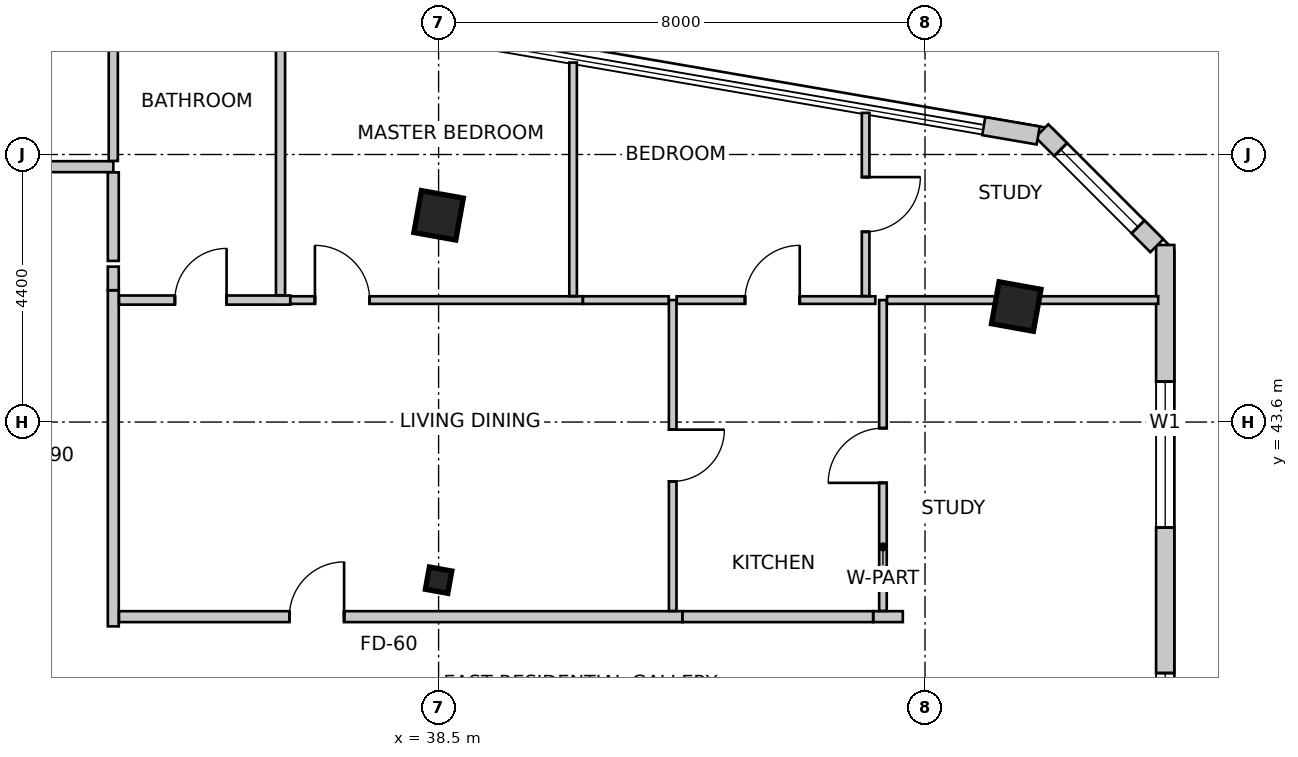
"""IFC4 building model, lengths in metres.
Left out: names, types, materials, properties, quantities, classifications, styles, units other than length and angle.
Written with IfcOpenShell. Run it as: python <this file> out.ifc"""

import sys

from ifc_helpers import new_model, si_unit, direction, frame, frame_2d, origin, origin_2d, place, context, subcontext, project, spatial, rectangle, i_section, extrude, source, transform, mapped, element, fill, save


model = new_model("IFC4")
c1 = context("Model", 3, precision=1e-05, world=origin(), true_north=direction((0.0, 1.0)))
c2 = subcontext(c1, "Body", "Model", "MODEL_VIEW")
j1 = project(units=[si_unit("LENGTHUNIT", "METRE"), si_unit("PLANEANGLEUNIT", "RADIAN")], contexts=[c1])
p1 = place(None, origin())
s1 = spatial("IfcSite", under=j1, at=p1, CompositionType="ELEMENT")
p2 = place(p1, origin())
s2 = spatial("IfcBuilding", under=s1, at=p2, CompositionType="ELEMENT")
p3 = place(p2, frame((0.0, 0.0, 183.4)))
s3 = spatial("IfcBuildingStorey", under=s2, at=p3, CompositionType="ELEMENT", Elevation=183.4)
m1 = source(origin(), c2, "Body", "SweptSolid", [
    extrude(rectangle(XDim=0.7, YDim=0.7, at=origin_2d()), origin(), (0.0, 0.0, 1.0), 3.5),
])
for number, where, z_axis, x_axis in (
    (1, (38.5, 47.0, 0.0), (0.0, 0.0, 1.0), (0.984, -0.177, 0.0)),
    (2, (48.0, 45.5, 0.0), (0.0, 0.0, 1.0), (0.984, -0.177, 0.0)),
):
    element("IfcColumn", number, at=place(p3, frame(where, z_axis=z_axis, x_axis=x_axis)), inside=s3, PredefinedType="COLUMN", context=c2, shape_type="MappedRepresentation", body=[
        mapped(m1, transform((0.0, 0.0, 0.0), scale=1.0)),
    ])
m2 = source(origin(), c2, "Body", "SweptSolid", [
    extrude(i_section(OverallWidth=0.374, OverallDepth=0.372, WebThickness=0.016, FlangeThickness=0.026, FilletRadius=0.015, at=origin_2d()), origin(), (0.0, 0.0, 1.0), 3.5),
])
p4 = place(p3, frame((38.5, 41.0, 0.0), z_axis=(0.0, 0.0, 1.0), x_axis=(0.984195607969, -0.17708474032, 0.0)))
e3 = element("IfcColumn", 3, at=p4, inside=s3, PredefinedType="COLUMN", context=c2, shape_type="MappedRepresentation", body=[
    mapped(m2, transform((0.0, 0.0, 0.0), scale=1.0)),
])
p5 = place(p3, frame((50.45, 35.781, 0.0), z_axis=(0.0, 0.0, 1.0), x_axis=(0.0, 1.0, 0.0)))
e4 = element("IfcWall", 4, at=p5, inside=s3, PredefinedType="SOLIDWALL", context=c2, shape_type="SweptSolid", body=[
    extrude(rectangle(XDim=10.731, YDim=0.3, at=frame_2d((5.365, 0.0))), origin(), (0.0, 0.0, 1.0), 3.25),
])
m3 = source(origin(), c2, "Body", "SweptSolid", [
    extrude(rectangle(XDim=2.1, YDim=2.0, at=frame_2d((1.05, 1.0))), frame((0.0, 0.16, 0.0), z_axis=(0.0, -1.0, 0.0), x_axis=(1.0, 0.0, 0.0)), (0.0, 0.0, 1.0), 0.32),
])
p6 = place(p5, frame((1.591, 0.0, 0.85)))
e5 = element("IfcOpeningElement", 5, at=p6, cuts=e4, PredefinedType="OPENING", context=c2, shape_type="MappedRepresentation", body=[
    mapped(m3, transform((0.0, 0.0, 0.0), scale=1.0)),
])
m4 = source(origin(), c2, "Body", "SweptSolid", [
    extrude(rectangle(XDim=2.4, YDim=2.2, at=frame_2d((1.2, 1.1))), frame((0.0, 0.16, 0.0), z_axis=(0.0, -1.0, 0.0), x_axis=(1.0, 0.0, 0.0)), (0.0, 0.0, 1.0), 0.32),
])
p7 = place(p5, frame((6.084, 0.0, 0.85)))
e6 = element("IfcOpeningElement", 6, at=p7, cuts=e4, PredefinedType="OPENING", context=c2, shape_type="MappedRepresentation", body=[
    mapped(m4, transform((0.0, 0.0, 0.0), scale=1.0)),
])
p8 = place(p3, frame((50.312, 46.5, 0.0), z_axis=(0.0, 0.0, 1.0), x_axis=(-0.707106781187, 0.707106781187, 0.0)))
e7 = element("IfcWall", 7, at=p8, inside=s3, PredefinedType="SOLIDWALL", context=c2, shape_type="SweptSolid", body=[
    extrude(rectangle(XDim=2.673, YDim=0.3, at=frame_2d((1.337, 0.0))), origin(), (0.0, 0.0, 1.0), 3.25),
])
m5 = source(origin(), c2, "Body", "SweptSolid", [
    extrude(rectangle(XDim=1.8, YDim=2.1, at=frame_2d((0.9, 1.05))), frame((0.0, 0.16, 0.0), z_axis=(0.0, -1.0, 0.0), x_axis=(1.0, 0.0, 0.0)), (0.0, 0.0, 1.0), 0.32),
])
p9 = place(p8, frame((0.437, 0.0, 0.85)))
e8 = element("IfcOpeningElement", 8, at=p9, cuts=e7, PredefinedType="OPENING", context=c2, shape_type="MappedRepresentation", body=[
    mapped(m5, transform((0.0, 0.0, 0.0), scale=1.0)),
])
p10 = place(p3, frame((48.361, 48.313, 0.0), z_axis=(0.0, 0.0, 1.0), x_axis=(-0.985560806516, 0.169321872949, 0.0)))
e9 = element("IfcWall", 9, at=p10, inside=s3, PredefinedType="SOLIDWALL", context=c2, shape_type="SweptSolid", body=[
    extrude(rectangle(XDim=0.908, YDim=0.3, at=frame_2d((0.454, 0.0))), origin(), (0.0, 0.0, 1.0), 3.25),
])
p11 = place(p3, frame((28.362, 47.8, 0.0), z_axis=(0.0, 0.0, 1.0), x_axis=(1.0, 0.0, 0.0)))
e10 = element("IfcWall", 10, at=p11, inside=s3, PredefinedType="PARTITIONING", context=c2, shape_type="SweptSolid", body=[
    extrude(rectangle(XDim=4.788, YDim=0.18, at=frame_2d((2.394, 0.0))), origin(), (0.0, 0.0, 1.0), 2.688),
])
m6 = source(origin(), c2, "Body", "SweptSolid", [
    extrude(rectangle(XDim=0.85, YDim=2.15, at=frame_2d((0.425, 1.075))), frame((0.0, 0.1, 0.0), z_axis=(0.0, -1.0, 0.0), x_axis=(1.0, 0.0, 0.0)), (0.0, 0.0, 1.0), 0.2),
])
p12 = place(p11, frame((0.401, 0.0, 0.0)))
e11 = element("IfcOpeningElement", 11, at=p12, cuts=e10, PredefinedType="OPENING", context=c2, shape_type="MappedRepresentation", body=[
    mapped(m6, transform((0.0, 0.0, 0.0), scale=1.0)),
])
p13 = place(p3, frame((33.15, 47.706, 0.0), z_axis=(0.0, 0.0, 1.0), x_axis=(0.0, -1.0, 0.0)))
e12 = element("IfcWall", 12, at=p13, inside=s3, PredefinedType="PARTITIONING", context=c2, shape_type="SweptSolid", body=[
    extrude(rectangle(XDim=1.456, YDim=0.18, at=frame_2d((0.728, 0.0))), origin(), (0.0, 0.0, 1.0), 2.688),
])
p14 = place(p3, frame((33.15, 45.766, 0.0), z_axis=(0.0, 0.0, 1.0), x_axis=(0.0, -1.0, 0.0)))
e13 = element("IfcWall", 13, at=p14, inside=s3, PredefinedType="PARTITIONING", context=c2, shape_type="SweptSolid", body=[
    extrude(rectangle(XDim=5.526, YDim=0.18, at=frame_2d((2.763, 0.0))), origin(), (0.0, 0.0, 1.0), 2.688),
])
p15 = place(p3, frame((33.15, 46.156, 0.0), z_axis=(0.0, 0.0, 1.0), x_axis=(0.0, -1.0, 0.0)))
e14 = element("IfcWall", 14, at=p15, inside=s3, PredefinedType="PARTITIONING", context=c2, shape_type="SweptSolid", body=[
    extrude(rectangle(XDim=0.388, YDim=0.18, at=frame_2d((0.194, 0.0))), origin(), (0.0, 0.0, 1.0), 3.25),
])
p16 = place(p3, frame((33.15, 50.813, 0.0), z_axis=(0.0, 0.0, 1.0), x_axis=(0.0, -1.0, 0.0)))
e15 = element("IfcWall", 15, at=p16, inside=s3, PredefinedType="PARTITIONING", context=c2, shape_type="SweptSolid", body=[
    extrude(rectangle(XDim=2.919, YDim=0.15, at=frame_2d((1.459, 0.0))), origin(), (0.0, 0.0, 1.0), 2.542),
])
p17 = place(p3, frame((45.648, 40.4, 0.0), z_axis=(0.0, 0.0, 1.0), x_axis=(1.0, 0.0, 0.0)))
e16 = element("IfcWall", 16, at=p17, inside=s3, PredefinedType="PARTITIONING", context=c2, shape_type="SweptSolid", body=[
    extrude(rectangle(XDim=0.487, YDim=0.18, at=frame_2d((0.244, 0.0))), origin(), (0.0, 0.0, 1.0), 3.25),
])
p18 = place(p3, frame((33.244, 40.4, 0.0), z_axis=(0.0, 0.0, 1.0), x_axis=(1.0, 0.0, 0.0)))
e17 = element("IfcWall", 17, at=p18, inside=s3, PredefinedType="PARTITIONING", context=c2, shape_type="SweptSolid", body=[
    extrude(rectangle(XDim=9.266, YDim=0.18, at=frame_2d((4.633, 0.0))), origin(), (0.0, 0.0, 1.0), 2.688),
])
m7 = source(origin(), c2, "Body", "SweptSolid", [
    extrude(rectangle(XDim=0.9, YDim=2.15, at=frame_2d((0.45, 1.075))), frame((0.0, 0.1, 0.0), z_axis=(0.0, -1.0, 0.0), x_axis=(1.0, 0.0, 0.0)), (0.0, 0.0, 1.0), 0.2),
])
p19 = place(p18, frame((2.802, 0.0, 0.0)))
e18 = element("IfcOpeningElement", 18, at=p19, cuts=e17, PredefinedType="OPENING", context=c2, shape_type="MappedRepresentation", body=[
    mapped(m7, transform((0.0, 0.0, 0.0), scale=1.0)),
])
p20 = place(p3, frame((42.512, 40.4, 0.0), z_axis=(0.0, 0.0, 1.0), x_axis=(1.0, 0.0, 0.0)))
e19 = element("IfcWall", 19, at=p20, inside=s3, PredefinedType="PARTITIONING", context=c2, shape_type="SweptSolid", body=[
    extrude(rectangle(XDim=3.134, YDim=0.18, at=frame_2d((1.567, 0.0))), origin(), (0.0, 0.0, 1.0), 2.688),
])
p21 = place(p3, frame((45.808, 40.494, 0.0), z_axis=(0.0, 0.0, 1.0), x_axis=(0.0, 1.0, 0.0)))
e20 = element("IfcWall", 20, at=p21, inside=s3, PredefinedType="PARTITIONING", context=c2, shape_type="SweptSolid", body=[
    extrude(rectangle(XDim=5.112, YDim=0.125, at=frame_2d((2.556, 0.0))), origin(), (0.0, 0.0, 1.0), 2.688),
])
m8 = source(origin(), c2, "Body", "SweptSolid", [
    extrude(rectangle(XDim=0.9, YDim=2.15, at=frame_2d((0.45, 1.075))), frame((0.0, 0.073, 0.0), z_axis=(0.0, -1.0, 0.0), x_axis=(1.0, 0.0, 0.0)), (0.0, 0.0, 1.0), 0.145),
])
p22 = place(p21, frame((2.106, 0.0, 0.0)))
e21 = element("IfcOpeningElement", 21, at=p22, cuts=e20, PredefinedType="OPENING", context=c2, shape_type="MappedRepresentation", body=[
    mapped(m8, transform((0.0, 0.0, 0.0), scale=1.0)),
])
p23 = place(p3, frame((45.875, 45.606, 0.0), z_axis=(0.0, 0.0, 1.0), x_axis=(1.0, 0.0, 0.0)))
e22 = element("IfcWall", 22, at=p23, inside=s3, PredefinedType="PARTITIONING", context=c2, shape_type="SweptSolid", body=[
    extrude(rectangle(XDim=4.46, YDim=0.125, at=frame_2d((2.23, 0.0))), origin(), (0.0, 0.0, 1.0), 2.542),
])
p24 = place(p3, frame((42.35, 45.606, 0.0), z_axis=(0.0, 0.0, 1.0), x_axis=(0.0, -1.0, 0.0)))
e23 = element("IfcWall", 23, at=p24, inside=s3, PredefinedType="PARTITIONING", context=c2, shape_type="SweptSolid", body=[
    extrude(rectangle(XDim=5.112, YDim=0.125, at=frame_2d((2.556, 0.0))), origin(), (0.0, 0.0, 1.0), 2.835),
])
m9 = source(origin(), c2, "Body", "SweptSolid", [
    extrude(rectangle(XDim=0.85, YDim=2.15, at=frame_2d((0.425, 1.075))), frame((0.0, 0.073, 0.0), z_axis=(0.0, -1.0, 0.0), x_axis=(1.0, 0.0, 0.0)), (0.0, 0.0, 1.0), 0.145),
])
p25 = place(p24, frame((2.131, 0.0, 0.0)))
e24 = element("IfcOpeningElement", 24, at=p25, cuts=e23, PredefinedType="OPENING", context=c2, shape_type="MappedRepresentation", body=[
    mapped(m9, transform((0.0, 0.0, 0.0), scale=1.0)),
])
p26 = place(p3, frame((33.244, 45.606, 0.0), z_axis=(0.0, 0.0, 1.0), x_axis=(1.0, 0.0, 0.0)))
e25 = element("IfcWall", 25, at=p26, inside=s3, PredefinedType="PARTITIONING", context=c2, shape_type="SweptSolid", body=[
    extrude(rectangle(XDim=2.816, YDim=0.15, at=frame_2d((1.408, 0.0))), origin(), (0.0, 0.0, 1.0), 2.688),
])
m10 = source(origin(), c2, "Body", "SweptSolid", [
    extrude(rectangle(XDim=0.85, YDim=2.15, at=frame_2d((0.425, 1.075))), frame((0.0, 0.085, 0.0), z_axis=(0.0, -1.0, 0.0), x_axis=(1.0, 0.0, 0.0)), (0.0, 0.0, 1.0), 0.17),
])
p27 = place(p26, frame((0.919, 0.0, 0.0)))
e26 = element("IfcOpeningElement", 26, at=p27, cuts=e25, PredefinedType="OPENING", context=c2, shape_type="MappedRepresentation", body=[
    mapped(m10, transform((0.0, 0.0, 0.0), scale=1.0)),
])
p28 = place(p3, frame((36.062, 45.606, 0.0), z_axis=(0.0, 0.0, 1.0), x_axis=(1.0, 0.0, 0.0)))
e27 = element("IfcWall", 27, at=p28, inside=s3, PredefinedType="PARTITIONING", context=c2, shape_type="SweptSolid", body=[
    extrude(rectangle(XDim=4.81, YDim=0.125, at=frame_2d((2.405, 0.0))), origin(), (0.0, 0.0, 1.0), 2.766),
])
p29 = place(p28, frame((0.404, 0.0, 0.0)))
e28 = element("IfcOpeningElement", 28, at=p29, cuts=e27, PredefinedType="OPENING", context=c2, shape_type="MappedRepresentation", body=[
    mapped(m8, transform((0.0, 0.0, 0.0), scale=1.0)),
])
p30 = place(p3, frame((40.874, 45.606, 0.0), z_axis=(0.0, 0.0, 1.0), x_axis=(1.0, 0.0, 0.0)))
e29 = element("IfcWall", 29, at=p30, inside=s3, PredefinedType="PARTITIONING", context=c2, shape_type="SweptSolid", body=[
    extrude(rectangle(XDim=1.409, YDim=0.125, at=frame_2d((0.705, 0.0))), origin(), (0.0, 0.0, 1.0), 3.25),
])
p31 = place(p3, frame((42.417, 45.606, 0.0), z_axis=(0.0, 0.0, 1.0), x_axis=(1.0, 0.0, 0.0)))
e30 = element("IfcWall", 30, at=p31, inside=s3, PredefinedType="PARTITIONING", context=c2, shape_type="SweptSolid", body=[
    extrude(rectangle(XDim=3.267, YDim=0.125, at=frame_2d((1.633, 0.0))), origin(), (0.0, 0.0, 1.0), 3.25),
])
p32 = place(p31, frame((1.123, 0.0, 0.0)))
e31 = element("IfcOpeningElement", 31, at=p32, cuts=e30, PredefinedType="OPENING", context=c2, shape_type="MappedRepresentation", body=[
    mapped(m8, transform((0.0, 0.0, 0.0), scale=1.0)),
])
p33 = place(p3, frame((35.9, 50.34, 0.0), z_axis=(0.0, 0.0, 1.0), x_axis=(0.0, -1.0, 0.0)))
e32 = element("IfcWall", 32, at=p33, inside=s3, PredefinedType="PARTITIONING", context=c2, shape_type="SweptSolid", body=[
    extrude(rectangle(XDim=4.655, YDim=0.15, at=frame_2d((2.327, 0.0))), origin(), (0.0, 0.0, 1.0), 2.542),
])
p34 = place(p3, frame((40.712, 49.512, 0.0), z_axis=(0.0, 0.0, 1.0), x_axis=(0.0, -1.0, 0.0)))
e33 = element("IfcWall", 33, at=p34, inside=s3, PredefinedType="PARTITIONING", context=c2, shape_type="SweptSolid", body=[
    extrude(rectangle(XDim=3.84, YDim=0.125, at=frame_2d((1.92, 0.0))), origin(), (0.0, 0.0, 1.0), 2.542),
])
p35 = place(p3, frame((45.523, 48.684, 0.0), z_axis=(0.0, 0.0, 1.0), x_axis=(0.0, -1.0, 0.0)))
e34 = element("IfcWall", 34, at=p35, inside=s3, PredefinedType="PARTITIONING", context=c2, shape_type="SweptSolid", body=[
    extrude(rectangle(XDim=3.012, YDim=0.125, at=frame_2d((1.506, 0.0))), origin(), (0.0, 0.0, 1.0), 2.542),
])
p36 = place(p35, frame((1.056, 0.0, 0.0)))
e35 = element("IfcOpeningElement", 35, at=p36, cuts=e34, PredefinedType="OPENING", context=c2, shape_type="MappedRepresentation", body=[
    mapped(m8, transform((0.0, 0.0, 0.0), scale=1.0)),
])
m11 = source(origin(), c2, "Body", "SweptSolid", [
    extrude(rectangle(XDim=2.1, YDim=2.0, at=frame_2d((1.05, 1.0))), frame((0.0, -0.015, 0.0), z_axis=(0.0, -1.0, 0.0), x_axis=(1.0, 0.0, 0.0)), (0.0, 0.0, 1.0), 0.06),
])
p37 = place(p6, origin())
e36 = element("IfcWindow", 36, at=p37, inside=s3, PartitioningType="SINGLE_PANEL", PredefinedType="WINDOW", context=c2, shape_type="MappedRepresentation", body=[
    mapped(m11, transform((0.0, 0.0, 0.0), scale=1.0)),
])
fill(e5, e36)
m12 = source(origin(), c2, "Body", "SweptSolid", [
    extrude(rectangle(XDim=2.4, YDim=2.2, at=frame_2d((1.2, 1.1))), frame((0.0, -0.015, 0.0), z_axis=(0.0, -1.0, 0.0), x_axis=(1.0, 0.0, 0.0)), (0.0, 0.0, 1.0), 0.06),
])
p38 = place(p7, origin())
e37 = element("IfcWindow", 37, at=p38, inside=s3, PartitioningType="SINGLE_PANEL", PredefinedType="WINDOW", context=c2, shape_type="MappedRepresentation", body=[
    mapped(m12, transform((0.0, 0.0, 0.0), scale=1.0)),
])
fill(e6, e37)
m13 = source(origin(), c2, "Body", "SweptSolid", [
    extrude(rectangle(XDim=1.8, YDim=2.1, at=frame_2d((0.9, 1.05))), frame((0.0, -0.015, 0.0), z_axis=(0.0, -1.0, 0.0), x_axis=(1.0, 0.0, 0.0)), (0.0, 0.0, 1.0), 0.06),
])
p39 = place(p9, origin())
e38 = element("IfcWindow", 38, at=p39, inside=s3, PartitioningType="SINGLE_PANEL", PredefinedType="WINDOW", context=c2, shape_type="MappedRepresentation", body=[
    mapped(m13, transform((0.0, 0.0, 0.0), scale=1.0)),
])
fill(e8, e38)
m14 = source(origin(), c2, "Body", "SweptSolid", [
    extrude(rectangle(XDim=0.9, YDim=2.15, at=frame_2d((0.45, 1.075))), frame((0.0, 0.025, 0.0), z_axis=(0.0, -1.0, 0.0), x_axis=(1.0, 0.0, 0.0)), (0.0, 0.0, 1.0), 0.05),
])
p40 = place(p22, origin())
e39 = element("IfcDoor", 39, at=p40, inside=s3, OperationType="SINGLE_SWING_LEFT", PredefinedType="DOOR", context=c2, shape_type="MappedRepresentation", body=[
    mapped(m14, transform((0.0, 0.0, 0.0), scale=1.0)),
])
fill(e21, e39)
m15 = source(origin(), c2, "Body", "SweptSolid", [
    extrude(rectangle(XDim=0.9, YDim=2.15, at=frame_2d((0.45, 1.075))), frame((0.0, 0.025, 0.0), z_axis=(0.0, -1.0, 0.0), x_axis=(1.0, 0.0, 0.0)), (0.0, 0.0, 1.0), 0.05),
])
p41 = place(p19, origin())
e40 = element("IfcDoor", 40, at=p41, inside=s3, OperationType="SINGLE_SWING_RIGHT", PredefinedType="DOOR", context=c2, shape_type="MappedRepresentation", body=[
    mapped(m15, transform((0.0, 0.0, 0.0), scale=1.0)),
])
fill(e18, e40)
m16 = source(origin(), c2, "Body", "SweptSolid", [
    extrude(rectangle(XDim=0.85, YDim=2.15, at=frame_2d((0.425, 1.075))), frame((0.0, 0.025, 0.0), z_axis=(0.0, -1.0, 0.0), x_axis=(1.0, 0.0, 0.0)), (0.0, 0.0, 1.0), 0.05),
])
p42 = place(p25, origin())
e41 = element("IfcDoor", 41, at=p42, inside=s3, OperationType="SINGLE_SWING_LEFT", PredefinedType="DOOR", context=c2, shape_type="MappedRepresentation", body=[
    mapped(m16, transform((0.0, 0.0, 0.0), scale=1.0)),
])
fill(e24, e41)
p43 = place(p27, origin())
e42 = element("IfcDoor", 42, at=p43, inside=s3, OperationType="SINGLE_SWING_RIGHT", PredefinedType="DOOR", context=c2, shape_type="MappedRepresentation", body=[
    mapped(m16, transform((0.0, 0.0, 0.0), scale=1.0)),
])
fill(e26, e42)
p44 = place(p29, origin())
e43 = element("IfcDoor", 43, at=p44, inside=s3, OperationType="SINGLE_SWING_LEFT", PredefinedType="DOOR", context=c2, shape_type="MappedRepresentation", body=[
    mapped(m14, transform((0.0, 0.0, 0.0), scale=1.0)),
])
fill(e28, e43)
p45 = place(p32, origin())
e44 = element("IfcDoor", 44, at=p45, inside=s3, OperationType="SINGLE_SWING_RIGHT", PredefinedType="DOOR", context=c2, shape_type="MappedRepresentation", body=[
    mapped(m14, transform((0.0, 0.0, 0.0), scale=1.0)),
])
fill(e31, e44)
p46 = place(p36, origin())
e45 = element("IfcDoor", 45, at=p46, inside=s3, OperationType="SINGLE_SWING_LEFT", PredefinedType="DOOR", context=c2, shape_type="MappedRepresentation", body=[
    mapped(m14, transform((0.0, 0.0, 0.0), scale=1.0)),
])
fill(e35, e45)
save(model, sys.argv[1])
